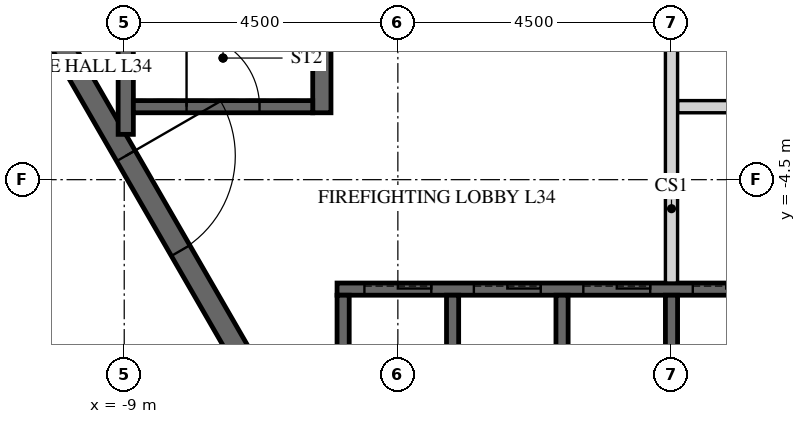
"""IFC4 building model, lengths in metres.
Left out: names, types, materials, properties, quantities, classifications, styles, units other than length and angle.
Written with IfcOpenShell. Run it as: python <this file> out.ifc"""

import sys

from ifc_helpers import new_model, si_unit, direction, frame, frame_2d, origin, place, context, subcontext, project, spatial, polyline, rectangle, outline, extrude, element, fill, save


model = new_model("IFC4")
c1 = context("Model", 3, precision=1e-05, world=origin(), true_north=direction((0.0, 1.0)))
c2 = subcontext(c1, "Body", "Model", "MODEL_VIEW")
j1 = project(units=[si_unit("LENGTHUNIT", "METRE"), si_unit("PLANEANGLEUNIT", "RADIAN")], contexts=[c1])
p1 = place(None, origin())
s1 = spatial("IfcSite", under=j1, at=p1, CompositionType="ELEMENT")
p2 = place(p1, origin())
s2 = spatial("IfcBuilding", under=s1, at=p2, CompositionType="ELEMENT")
p3 = place(p2, frame((0.0, 0.0, 146.7)))
s3 = spatial("IfcBuildingStorey", under=s2, at=p3, CompositionType="ELEMENT", Elevation=146.7)
p4 = place(p3, frame((-15.819, 0.0, -0.3), z_axis=(0.0, 0.0, 1.0), x_axis=(0.499999880136, -0.866025472988, 0.0)))
e1 = element("IfcWall", 1, at=p4, inside=s3, PredefinedType="SHEAR", context=c2, shape_type="SweptSolid", body=[
    extrude(outline(polyline([(-0.173, -0.3), (15.993, -0.3), (15.646, 0.3), (0.173, 0.3), (-0.173, -0.3)])), origin(), (0.0, 0.0, 1.0), 5.8),
])
p5 = place(p4, frame((6.981, 0.0, 0.3)))
e2 = element("IfcOpeningElement", 2, at=p5, cuts=e1, PredefinedType="OPENING", context=c2, shape_type="SweptSolid", body=[
    extrude(rectangle(XDim=1.8, YDim=2.4, at=frame_2d((0.9, 1.2))), frame((0.0, 0.31, 0.0), z_axis=(0.0, -1.0, 0.0), x_axis=(1.0, 0.0, 0.0)), (0.0, 0.0, 1.0), 0.62),
])
p6 = place(p3, frame((-11.345, 0.0, -0.3), z_axis=(0.0, 0.0, 1.0), x_axis=(0.499995046907, -0.866028263435, 0.0)))
e3 = element("IfcWall", 3, at=p6, inside=s3, PredefinedType="SHEAR", context=c2, shape_type="SweptSolid", body=[
    extrude(outline(polyline([(-0.101, -0.175), (11.446, -0.175), (11.244, 0.175), (0.101, 0.175), (-0.101, -0.175)])), origin(), (0.0, 0.0, 1.0), 5.8),
])
p7 = place(p6, frame((4.744, 0.0, 0.3)))
e4 = element("IfcOpeningElement", 4, at=p7, cuts=e3, PredefinedType="OPENING", context=c2, shape_type="SweptSolid", body=[
    extrude(rectangle(XDim=1.8, YDim=2.4, at=frame_2d((0.9, 1.2))), frame((0.0, 0.185, 0.0), z_axis=(0.0, -1.0, 0.0), x_axis=(1.0, 0.0, 0.0)), (0.0, 0.0, 1.0), 0.37),
])
p8 = place(p3, frame((-5.5, -6.3, -0.25), z_axis=(0.0, 0.0, 1.0), x_axis=(1.0, 0.0, 0.0)))
e5 = element("IfcWall", 5, at=p8, inside=s3, PredefinedType="SHEAR", context=c2, shape_type="SweptSolid", body=[
    extrude(rectangle(XDim=9.2, YDim=0.2, at=frame_2d((4.6, 0.0))), origin(), (0.0, 0.0, 1.0), 5.75),
])
p9 = place(p8, frame((0.45, 0.0, 0.25)))
e6 = element("IfcOpeningElement", 6, at=p9, cuts=e5, PredefinedType="OPENING", context=c2, shape_type="SweptSolid", body=[
    extrude(rectangle(XDim=1.1, YDim=2.1, at=frame_2d((0.55, 1.05))), frame((0.0, 0.11, 0.0), z_axis=(0.0, -1.0, 0.0), x_axis=(1.0, 0.0, 0.0)), (0.0, 0.0, 1.0), 0.22),
])
p10 = place(p8, frame((2.25, 0.0, 0.25)))
e7 = element("IfcOpeningElement", 7, at=p10, cuts=e5, PredefinedType="OPENING", context=c2, shape_type="SweptSolid", body=[
    extrude(rectangle(XDim=1.1, YDim=2.1, at=frame_2d((0.55, 1.05))), frame((0.0, 0.11, 0.0), z_axis=(0.0, -1.0, 0.0), x_axis=(1.0, 0.0, 0.0)), (0.0, 0.0, 1.0), 0.22),
])
p11 = place(p8, frame((4.05, 0.0, 0.25)))
e8 = element("IfcOpeningElement", 8, at=p11, cuts=e5, PredefinedType="OPENING", context=c2, shape_type="SweptSolid", body=[
    extrude(rectangle(XDim=1.1, YDim=2.1, at=frame_2d((0.55, 1.05))), frame((0.0, 0.11, 0.0), z_axis=(0.0, -1.0, 0.0), x_axis=(1.0, 0.0, 0.0)), (0.0, 0.0, 1.0), 0.22),
])
p12 = place(p8, frame((5.85, 0.0, 0.25)))
e9 = element("IfcOpeningElement", 9, at=p12, cuts=e5, PredefinedType="OPENING", context=c2, shape_type="SweptSolid", body=[
    extrude(rectangle(XDim=1.1, YDim=2.1, at=frame_2d((0.55, 1.05))), frame((0.0, 0.11, 0.0), z_axis=(0.0, -1.0, 0.0), x_axis=(1.0, 0.0, 0.0)), (0.0, 0.0, 1.0), 0.22),
])
p13 = place(p8, frame((7.65, 0.0, 0.25)))
e10 = element("IfcOpeningElement", 10, at=p13, cuts=e5, PredefinedType="OPENING", context=c2, shape_type="SweptSolid", body=[
    extrude(rectangle(XDim=1.1, YDim=2.1, at=frame_2d((0.55, 1.05))), frame((0.0, 0.11, 0.0), z_axis=(0.0, -1.0, 0.0), x_axis=(1.0, 0.0, 0.0)), (0.0, 0.0, 1.0), 0.22),
])
for number, where, z_axis, x_axis in (
    (11, (-5.4, -9.3, -0.25), (0.0, 0.0, 1.0), (0.0, 1.0, 0.0)),
    (12, (-3.6, -9.3, -0.25), (0.0, 0.0, 1.0), (0.0, 1.0, 0.0)),
    (13, (-1.8, -9.3, -0.25), (0.0, 0.0, 1.0), (0.0, 1.0, 0.0)),
    (14, (0.0, -9.3, -0.25), (0.0, 0.0, 1.0), (0.0, 1.0, 0.0)),
):
    element("IfcWall", number, at=place(p3, frame(where, z_axis=z_axis, x_axis=x_axis)), inside=s3, PredefinedType="SHEAR", context=c2, shape_type="SweptSolid", body=[
        extrude(rectangle(XDim=2.9, YDim=0.2, at=frame_2d((1.45, 0.0))), origin(), (0.0, 0.0, 1.0), 5.75),
    ])
p14 = place(p3, frame((0.1, -3.3, 0.0), z_axis=(0.0, 0.0, 1.0), x_axis=(1.0, 0.0, 0.0)))
e15 = element("IfcWall", 15, at=p14, inside=s3, PredefinedType="PARTITIONING", context=c2, shape_type="SweptSolid", body=[
    extrude(rectangle(XDim=5.5, YDim=0.2, at=frame_2d((2.75, 0.0))), origin(), (0.0, 0.0, 1.0), 5.5),
])
p15 = place(p14, frame((2.3, 0.0, 0.0)))
e16 = element("IfcOpeningElement", 16, at=p15, cuts=e15, PredefinedType="OPENING", context=c2, shape_type="SweptSolid", body=[
    extrude(rectangle(XDim=0.9, YDim=2.1, at=frame_2d((0.45, 1.05))), frame((0.0, 0.11, 0.0), z_axis=(0.0, -1.0, 0.0), x_axis=(1.0, 0.0, 0.0)), (0.0, 0.0, 1.0), 0.22),
])
p16 = place(p3, frame((0.0, -6.2, 0.0), z_axis=(0.0, 0.0, 1.0), x_axis=(0.0, 1.0, 0.0)))
e17 = element("IfcWall", 17, at=p16, inside=s3, PredefinedType="PARTITIONING", context=c2, shape_type="SweptSolid", body=[
    extrude(rectangle(XDim=6.1, YDim=0.2, at=frame_2d((3.05, 0.0))), origin(), (0.0, 0.0, 1.0), 5.5),
])
p17 = place(p3, frame((-5.75, -3.4, -0.25), z_axis=(0.0, 0.0, 1.0), x_axis=(0.0, 1.0, 0.0)))
e18 = element("IfcWall", 18, at=p17, inside=s3, PredefinedType="SHEAR", context=c2, shape_type="SweptSolid", body=[
    extrude(rectangle(XDim=6.8, YDim=0.3, at=frame_2d((3.4, 0.0))), origin(), (0.0, 0.0, 1.0), 5.75),
])
p18 = place(p3, frame((-8.975, -3.755, -0.25), z_axis=(0.0, 0.0, 1.0), x_axis=(0.0, 1.0, 0.0)))
e19 = element("IfcWall", 19, at=p18, inside=s3, PredefinedType="SHEAR", context=c2, shape_type="SweptSolid", body=[
    extrude(rectangle(XDim=7.51, YDim=0.25, at=frame_2d((3.755, 0.0))), origin(), (0.0, 0.0, 1.0), 5.75),
])
p19 = place(p3, frame((-8.85, -3.3, -0.25), z_axis=(0.0, 0.0, 1.0), x_axis=(1.0, 0.0, 0.0)))
e20 = element("IfcWall", 20, at=p19, inside=s3, PredefinedType="SHEAR", context=c2, shape_type="SweptSolid", body=[
    extrude(rectangle(XDim=2.95, YDim=0.2, at=frame_2d((1.475, 0.0))), origin(), (0.0, 0.0, 1.0), 5.75),
])
p20 = place(p19, frame((0.875, 0.0, 0.25)))
e21 = element("IfcOpeningElement", 21, at=p20, cuts=e20, PredefinedType="OPENING", context=c2, shape_type="SweptSolid", body=[
    extrude(rectangle(XDim=1.2, YDim=2.4, at=frame_2d((0.6, 1.2))), frame((0.0, 0.11, 0.0), z_axis=(0.0, -1.0, 0.0), x_axis=(1.0, 0.0, 0.0)), (0.0, 0.0, 1.0), 0.22),
])
p21 = place(p7, origin())
e22 = element("IfcDoor", 22, at=p21, inside=s3, OperationType="DOUBLE_DOOR_SINGLE_SWING", PredefinedType="DOOR", context=c2, shape_type="SweptSolid", body=[
    extrude(rectangle(XDim=1.8, YDim=2.4, at=frame_2d((0.9, 1.2))), frame((0.0, 0.025, 0.0), z_axis=(0.0, -1.0, 0.0), x_axis=(1.0, 0.0, 0.0)), (0.0, 0.0, 1.0), 0.05),
])
fill(e4, e22)
p22 = place(p20, origin())
e23 = element("IfcDoor", 23, at=p22, inside=s3, OperationType="SINGLE_SWING_LEFT", PredefinedType="DOOR", context=c2, shape_type="SweptSolid", body=[
    extrude(rectangle(XDim=1.2, YDim=2.4, at=frame_2d((0.6, 1.2))), frame((0.0, 0.025, 0.0), z_axis=(0.0, -1.0, 0.0), x_axis=(1.0, 0.0, 0.0)), (0.0, 0.0, 1.0), 0.05),
])
fill(e21, e23)
p23 = place(p9, origin())
e24 = element("IfcDoor", 24, at=p23, inside=s3, OperationType="SLIDING_TO_LEFT", PredefinedType="DOOR", context=c2, shape_type="SweptSolid", body=[
    extrude(rectangle(XDim=1.1, YDim=2.1, at=frame_2d((0.55, 1.05))), frame((0.0, 0.025, 0.0), z_axis=(0.0, -1.0, 0.0), x_axis=(1.0, 0.0, 0.0)), (0.0, 0.0, 1.0), 0.05),
])
fill(e6, e24)
p24 = place(p10, origin())
e25 = element("IfcDoor", 25, at=p24, inside=s3, OperationType="SLIDING_TO_LEFT", PredefinedType="DOOR", context=c2, shape_type="SweptSolid", body=[
    extrude(rectangle(XDim=1.1, YDim=2.1, at=frame_2d((0.55, 1.05))), frame((0.0, 0.025, 0.0), z_axis=(0.0, -1.0, 0.0), x_axis=(1.0, 0.0, 0.0)), (0.0, 0.0, 1.0), 0.05),
])
fill(e7, e25)
p25 = place(p11, origin())
e26 = element("IfcDoor", 26, at=p25, inside=s3, OperationType="SLIDING_TO_LEFT", PredefinedType="DOOR", context=c2, shape_type="SweptSolid", body=[
    extrude(rectangle(XDim=1.1, YDim=2.1, at=frame_2d((0.55, 1.05))), frame((0.0, 0.025, 0.0), z_axis=(0.0, -1.0, 0.0), x_axis=(1.0, 0.0, 0.0)), (0.0, 0.0, 1.0), 0.05),
])
fill(e8, e26)
p26 = place(p12, origin())
e27 = element("IfcDoor", 27, at=p26, inside=s3, OperationType="SLIDING_TO_LEFT", PredefinedType="DOOR", context=c2, shape_type="SweptSolid", body=[
    extrude(rectangle(XDim=1.1, YDim=2.1, at=frame_2d((0.55, 1.05))), frame((0.0, 0.025, 0.0), z_axis=(0.0, -1.0, 0.0), x_axis=(1.0, 0.0, 0.0)), (0.0, 0.0, 1.0), 0.05),
])
fill(e9, e27)
save(model, sys.argv[1])
